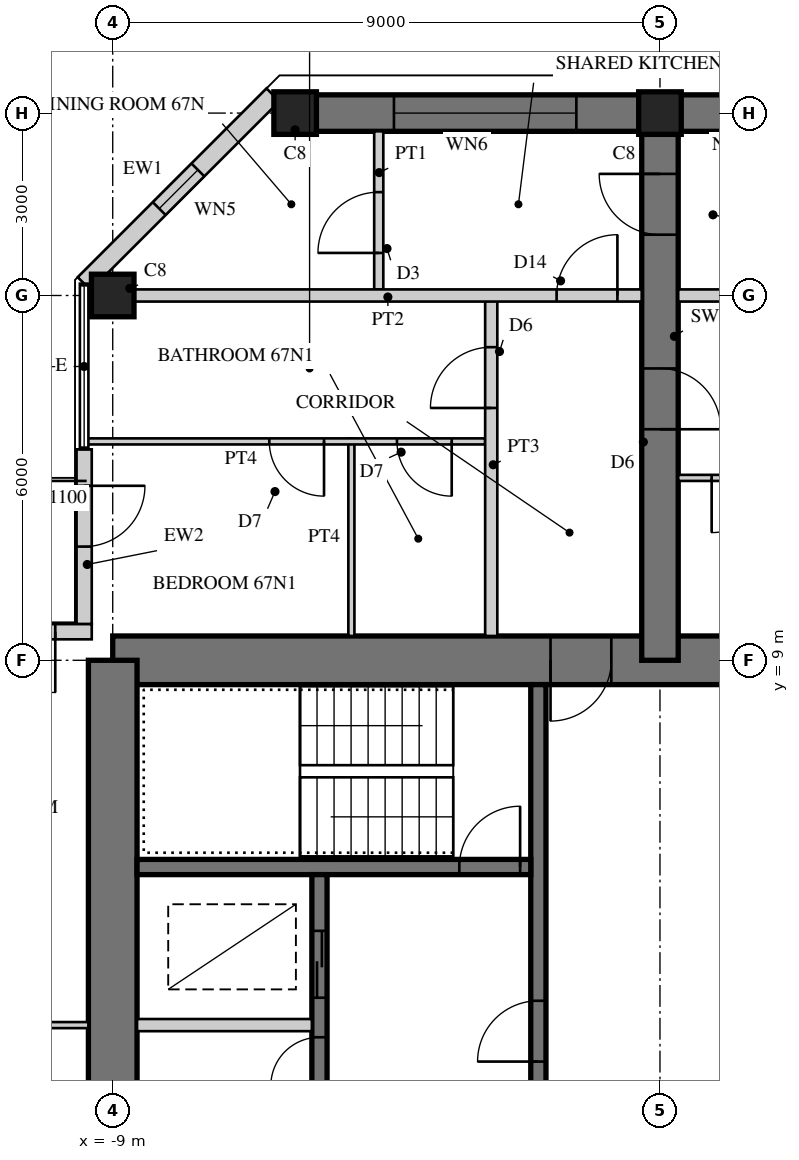
"""IFC4 building model, lengths in metres.
Left out: names, types, materials, properties, quantities, classifications, styles, units other than length and angle.
Written with IfcOpenShell. Run it as: python <this file> out.ifc"""

import sys

from ifc_helpers import new_model, si_unit, direction, frame, frame_2d, origin, origin_2d, place, context, subcontext, project, spatial, rectangle, hollow_rectangle, extrude, element, fill, save


model = new_model("IFC4")
c1 = context("Model", 3, precision=1e-05, world=origin(), true_north=direction((0.0, 1.0)))
c2 = subcontext(c1, "Body", "Model", "MODEL_VIEW")
j1 = project(units=[si_unit("LENGTHUNIT", "METRE"), si_unit("PLANEANGLEUNIT", "RADIAN")], contexts=[c1])
p1 = place(None, origin())
s1 = spatial("IfcSite", under=j1, at=p1, CompositionType="ELEMENT")
p2 = place(p1, origin())
s2 = spatial("IfcBuilding", under=s1, at=p2, CompositionType="ELEMENT")
p3 = place(p2, frame((0.0, 0.0, 261.1)))
s3 = spatial("IfcBuildingStorey", under=s2, at=p3, CompositionType="ELEMENT", Elevation=261.1)
p4 = place(p3, frame((9.0, 9.0, 0.0), z_axis=(0.0, 0.0, 1.0), x_axis=(-1.0, 0.0, 0.0)))
e1 = element("IfcWall", 1, at=p4, inside=s3, PredefinedType="SHEAR", context=c2, shape_type="SweptSolid", body=[
    extrude(rectangle(XDim=18.0, YDim=0.8, at=frame_2d((9.0, 0.0))), origin(), (0.0, 0.0, 1.0), 3.4),
])
p5 = place(p4, frame((9.8, 0.0, 0.0)))
e2 = element("IfcOpeningElement", 2, at=p5, cuts=e1, PredefinedType="OPENING", context=c2, shape_type="SweptSolid", body=[
    extrude(rectangle(XDim=1.0, YDim=2.4, at=frame_2d((0.5, 1.2))), frame((0.0, 0.41, 0.0), z_axis=(0.0, -1.0, 0.0), x_axis=(1.0, 0.0, 0.0)), (0.0, 0.0, 1.0), 0.82),
])
p6 = place(p3, frame((-9.0, 9.0, 0.0), z_axis=(0.0, 0.0, 1.0), x_axis=(0.0, -1.0, 0.0)))
e3 = element("IfcWall", 3, at=p6, inside=s3, PredefinedType="SHEAR", context=c2, shape_type="SweptSolid", body=[
    extrude(rectangle(XDim=18.0, YDim=0.8, at=frame_2d((9.0, 0.0))), origin(), (0.0, 0.0, 1.0), 3.4),
])
p7 = place(p6, frame((9.8, 0.0, 0.0)))
e4 = element("IfcOpeningElement", 4, at=p7, cuts=e3, PredefinedType="OPENING", context=c2, shape_type="SweptSolid", body=[
    extrude(rectangle(XDim=1.0, YDim=2.4, at=frame_2d((0.5, 1.2))), frame((0.0, 0.41, 0.0), z_axis=(0.0, -1.0, 0.0), x_axis=(1.0, 0.0, 0.0)), (0.0, 0.0, 1.0), 0.82),
])
p8 = place(p3, frame((-2.0, 1.675, 0.0), z_axis=(0.0, 0.0, 1.0), x_axis=(0.0, 1.0, 0.0)))
e5 = element("IfcWall", 5, at=p8, inside=s3, PredefinedType="SHEAR", context=c2, shape_type="SweptSolid", body=[
    extrude(rectangle(XDim=6.925, YDim=0.25, at=frame_2d((3.462, 0.0))), origin(), (0.0, 0.0, 1.0), 3.4),
])
p9 = place(p8, frame((0.725, 0.0, 0.0)))
e6 = element("IfcOpeningElement", 6, at=p9, cuts=e5, PredefinedType="OPENING", context=c2, shape_type="SweptSolid", body=[
    extrude(rectangle(XDim=1.0, YDim=2.1, at=frame_2d((0.5, 1.05))), frame((0.0, 0.135, 0.0), z_axis=(0.0, -1.0, 0.0), x_axis=(1.0, 0.0, 0.0)), (0.0, 0.0, 1.0), 0.27),
])
p10 = place(p3, frame((-2.125, 5.6, 0.0), z_axis=(0.0, 0.0, 1.0), x_axis=(-1.0, 0.0, 0.0)))
e7 = element("IfcWall", 7, at=p10, inside=s3, PredefinedType="SHEAR", context=c2, shape_type="SweptSolid", body=[
    extrude(rectangle(XDim=6.475, YDim=0.25, at=frame_2d((3.238, 0.0))), origin(), (0.0, 0.0, 1.0), 3.4),
])
p11 = place(p10, frame((0.175, 0.0, 0.0)))
e8 = element("IfcOpeningElement", 8, at=p11, cuts=e7, PredefinedType="OPENING", context=c2, shape_type="SweptSolid", body=[
    extrude(rectangle(XDim=1.0, YDim=2.1, at=frame_2d((0.5, 1.05))), frame((0.0, 0.135, 0.0), z_axis=(0.0, -1.0, 0.0), x_axis=(1.0, 0.0, 0.0)), (0.0, 0.0, 1.0), 0.27),
])
p12 = place(p3, frame((-5.6, 1.925, 0.0), z_axis=(0.0, 0.0, 1.0), x_axis=(0.0, 1.0, 0.0)))
e9 = element("IfcWall", 9, at=p12, inside=s3, PredefinedType="SHEAR", context=c2, shape_type="SweptSolid", body=[
    extrude(rectangle(XDim=3.55, YDim=0.25, at=frame_2d((1.775, 0.0))), origin(), (0.0, 0.0, 1.0), 3.4),
])
p13 = place(p12, frame((1.525, 0.0, 0.0)))
e10 = element("IfcOpeningElement", 10, at=p13, cuts=e9, PredefinedType="OPENING", context=c2, shape_type="SweptSolid", body=[
    extrude(rectangle(XDim=1.1, YDim=2.2, at=frame_2d((0.55, 1.1))), frame((0.0, 0.135, 0.0), z_axis=(0.0, -1.0, 0.0), x_axis=(1.0, 0.0, 0.0)), (0.0, 0.0, 1.0), 0.27),
])
p14 = place(p12, frame((0.075, 0.0, 0.0)))
e11 = element("IfcOpeningElement", 11, at=p14, cuts=e9, PredefinedType="OPENING", context=c2, shape_type="SweptSolid", body=[
    extrude(rectangle(XDim=0.8, YDim=2.1, at=frame_2d((0.4, 1.05))), frame((0.0, 0.135, 0.0), z_axis=(0.0, -1.0, 0.0), x_axis=(1.0, 0.0, 0.0)), (0.0, 0.0, 1.0), 0.27),
])
p15 = place(p3, frame((-5.725, 3.0, 0.0), z_axis=(0.0, 0.0, 1.0), x_axis=(-1.0, 0.0, 0.0)))
e12 = element("IfcWall", 12, at=p15, inside=s3, PredefinedType="PARTITIONING", context=c2, shape_type="SweptSolid", body=[
    extrude(rectangle(XDim=2.875, YDim=0.2, at=frame_2d((1.438, 0.0))), origin(), (0.0, 0.0, 1.0), 3.4),
])
p16 = place(p3, frame((0.0, 9.0, 0.0), z_axis=(0.0, 0.0, 1.0), x_axis=(0.0, 1.0, 0.0)))
e13 = element("IfcWall", 13, at=p16, inside=s3, PredefinedType="SHEAR", context=c2, shape_type="SweptSolid", body=[
    extrude(rectangle(XDim=9.0, YDim=0.6, at=frame_2d((4.5, 0.0))), origin(), (0.0, 0.0, 1.0), 3.4),
])
p17 = place(p16, frame((3.8, 0.0, 0.0)))
e14 = element("IfcOpeningElement", 14, at=p17, cuts=e13, PredefinedType="OPENING", context=c2, shape_type="SweptSolid", body=[
    extrude(rectangle(XDim=1.0, YDim=2.15, at=frame_2d((0.5, 1.075))), frame((0.0, 0.31, 0.0), z_axis=(0.0, -1.0, 0.0), x_axis=(1.0, 0.0, 0.0)), (0.0, 0.0, 1.0), 0.62),
])
p18 = place(p16, frame((7.0, 0.0, 0.0)))
e15 = element("IfcOpeningElement", 15, at=p18, cuts=e13, PredefinedType="OPENING", context=c2, shape_type="SweptSolid", body=[
    extrude(rectangle(XDim=1.0, YDim=2.2, at=frame_2d((0.5, 1.1))), frame((0.0, 0.31, 0.0), z_axis=(0.0, -1.0, 0.0), x_axis=(1.0, 0.0, 0.0)), (0.0, 0.0, 1.0), 0.62),
])
p19 = place(p3, frame((6.0, 18.0, 0.0), z_axis=(0.0, 0.0, 1.0), x_axis=(-1.0, 0.0, 0.0)))
e16 = element("IfcWall", 16, at=p19, inside=s3, PredefinedType="SHEAR", context=c2, shape_type="SweptSolid", body=[
    extrude(rectangle(XDim=12.0, YDim=0.6, at=frame_2d((6.0, 0.0))), origin(), (0.0, 0.0, 1.0), 3.4),
])
p20 = place(p19, frame((1.625, 0.0, 0.6)))
e17 = element("IfcOpeningElement", 17, at=p20, cuts=e16, PredefinedType="OPENING", context=c2, shape_type="SweptSolid", body=[
    extrude(rectangle(XDim=3.0, YDim=2.4, at=frame_2d((1.5, 1.2))), frame((0.0, 0.31, 0.0), z_axis=(0.0, -1.0, 0.0), x_axis=(1.0, 0.0, 0.0)), (0.0, 0.0, 1.0), 0.62),
])
p21 = place(p19, frame((7.375, 0.0, 0.6)))
e18 = element("IfcOpeningElement", 18, at=p21, cuts=e16, PredefinedType="OPENING", context=c2, shape_type="SweptSolid", body=[
    extrude(rectangle(XDim=3.0, YDim=2.4, at=frame_2d((1.5, 1.2))), frame((0.0, 0.31, 0.0), z_axis=(0.0, -1.0, 0.0), x_axis=(1.0, 0.0, 0.0)), (0.0, 0.0, 1.0), 0.62),
])
for number, where, z_axis, x_axis in (
    (19, (-9.0, 15.0, 0.0), (0.0, 0.0, 1.0), (1.0, 0.0, 0.0)),
    (20, (0.0, 18.0, 0.0), (0.0, 0.0, 1.0), (1.0, 0.0, 0.0)),
    (21, (-6.0, 18.0, 0.0), (0.0, 0.0, 1.0), (1.0, 0.0, 0.0)),
):
    element("IfcColumn", number, at=place(p3, frame(where, z_axis=z_axis, x_axis=x_axis)), inside=s3, PredefinedType="COLUMN", context=c2, shape_type="SweptSolid", body=[
        extrude(rectangle(XDim=0.7, YDim=0.7, at=origin_2d()), origin(), (0.0, 0.0, 1.0), 3.4),
    ])
p22 = place(p3, frame((-6.365, 18.3, 0.0), z_axis=(0.0, 0.0, 1.0), x_axis=(-0.70707898447, -0.707134576811, 0.0)))
e22 = element("IfcWall", 22, at=p22, inside=s3, PredefinedType="SOLIDWALL", context=c2, shape_type="SweptSolid", body=[
    extrude(rectangle(XDim=4.392, YDim=0.3, at=frame_2d((2.196, 0.0))), origin(), (0.0, 0.0, 1.0), 3.22),
])
p23 = place(p22, frame((1.746, 0.0, 0.3)))
e23 = element("IfcOpeningElement", 23, at=p23, cuts=e22, PredefinedType="OPENING", context=c2, shape_type="SweptSolid", body=[
    extrude(rectangle(XDim=0.9, YDim=2.4, at=frame_2d((0.45, 1.2))), frame((0.0, 0.16, 0.0), z_axis=(0.0, -1.0, 0.0), x_axis=(1.0, 0.0, 0.0)), (0.0, 0.0, 1.0), 0.32),
])
p24 = place(p3, frame((-9.47, 12.47, 0.0), z_axis=(0.0, 0.0, 1.0), x_axis=(0.0, -1.0, 0.0)))
e24 = element("IfcWall", 24, at=p24, inside=s3, PredefinedType="SOLIDWALL", context=c2, shape_type="SweptSolid", body=[
    extrude(rectangle(XDim=2.875, YDim=0.25, at=frame_2d((1.438, 0.0))), origin(), (0.0, 0.0, 1.0), 3.22),
])
p25 = place(p24, frame((0.6, 0.0, 0.0)))
e25 = element("IfcOpeningElement", 25, at=p25, cuts=e24, PredefinedType="OPENING", context=c2, shape_type="SweptSolid", body=[
    extrude(rectangle(XDim=1.0, YDim=2.2, at=frame_2d((0.5, 1.1))), frame((0.0, 0.135, 0.0), z_axis=(0.0, -1.0, 0.0), x_axis=(1.0, 0.0, 0.0)), (0.0, 0.0, 1.0), 0.27),
])
p26 = place(p3, frame((-9.345, 9.47, 0.0), z_axis=(0.0, 0.0, 1.0), x_axis=(-1.0, 0.0, 0.0)))
e26 = element("IfcWall", 26, at=p26, inside=s3, PredefinedType="SOLIDWALL", context=c2, shape_type="SweptSolid", body=[
    extrude(rectangle(XDim=3.125, YDim=0.25, at=frame_2d((1.562, 0.0))), origin(), (0.0, 0.0, 1.0), 3.22),
])
p27 = place(p26, frame((0.6, 0.0, 0.0)))
e27 = element("IfcOpeningElement", 27, at=p27, cuts=e26, PredefinedType="OPENING", context=c2, shape_type="SweptSolid", body=[
    extrude(rectangle(XDim=1.0, YDim=2.2, at=frame_2d((0.5, 1.1))), frame((0.0, 0.135, 0.0), z_axis=(0.0, -1.0, 0.0), x_axis=(1.0, 0.0, 0.0)), (0.0, 0.0, 1.0), 0.27),
])
p28 = place(p3, frame((-5.075, 9.4, 0.0), z_axis=(0.0, 0.0, 1.0), x_axis=(0.0, 1.0, 0.0)))
e28 = element("IfcWall", 28, at=p28, inside=s3, PredefinedType="PARTITIONING", context=c2, shape_type="SweptSolid", body=[
    extrude(rectangle(XDim=3.25, YDim=0.1, at=frame_2d((1.625, 0.0))), origin(), (0.0, 0.0, 1.0), 3.22),
])
p29 = place(p3, frame((-2.875, 12.6, 0.0), z_axis=(0.0, 0.0, 1.0), x_axis=(-1.0, 0.0, 0.0)))
e29 = element("IfcWall", 29, at=p29, inside=s3, PredefinedType="PARTITIONING", context=c2, shape_type="SweptSolid", body=[
    extrude(rectangle(XDim=6.555, YDim=0.1, at=frame_2d((3.277, 0.0))), origin(), (0.0, 0.0, 1.0), 3.22),
])
p30 = place(p29, frame((0.55, 0.0, 0.0)))
e30 = element("IfcOpeningElement", 30, at=p30, cuts=e29, PredefinedType="OPENING", context=c2, shape_type="SweptSolid", body=[
    extrude(rectangle(XDim=0.9, YDim=2.1, at=frame_2d((0.45, 1.05))), frame((0.0, 0.06, 0.0), z_axis=(0.0, -1.0, 0.0), x_axis=(1.0, 0.0, 0.0)), (0.0, 0.0, 1.0), 0.12),
])
p31 = place(p29, frame((2.65, 0.0, 0.0)))
e31 = element("IfcOpeningElement", 31, at=p31, cuts=e29, PredefinedType="OPENING", context=c2, shape_type="SweptSolid", body=[
    extrude(rectangle(XDim=0.9, YDim=2.1, at=frame_2d((0.45, 1.05))), frame((0.0, 0.06, 0.0), z_axis=(0.0, -1.0, 0.0), x_axis=(1.0, 0.0, 0.0)), (0.0, 0.0, 1.0), 0.12),
])
p32 = place(p3, frame((9.345, 12.0, 0.0), z_axis=(0.0, 0.0, 1.0), x_axis=(-1.0, 0.0, 0.0)))
e32 = element("IfcWall", 32, at=p32, inside=s3, PredefinedType="PARTITIONING", context=c2, shape_type="SweptSolid", body=[
    extrude(rectangle(XDim=9.045, YDim=0.1, at=frame_2d((4.522, 0.0))), origin(), (0.0, 0.0, 1.0), 3.22),
])
p33 = place(p32, frame((5.495, 0.0, 0.0)))
e33 = element("IfcOpeningElement", 33, at=p33, cuts=e32, PredefinedType="OPENING", context=c2, shape_type="SweptSolid", body=[
    extrude(rectangle(XDim=0.9, YDim=2.1, at=frame_2d((0.45, 1.05))), frame((0.0, 0.06, 0.0), z_axis=(0.0, -1.0, 0.0), x_axis=(1.0, 0.0, 0.0)), (0.0, 0.0, 1.0), 0.12),
])
p34 = place(p32, frame((7.595, 0.0, 0.0)))
e34 = element("IfcOpeningElement", 34, at=p34, cuts=e32, PredefinedType="OPENING", context=c2, shape_type="SweptSolid", body=[
    extrude(rectangle(XDim=0.9, YDim=2.1, at=frame_2d((0.45, 1.05))), frame((0.0, 0.06, 0.0), z_axis=(0.0, -1.0, 0.0), x_axis=(1.0, 0.0, 0.0)), (0.0, 0.0, 1.0), 0.12),
])
p35 = place(p3, frame((-2.775, 9.4, 0.0), z_axis=(0.0, 0.0, 1.0), x_axis=(0.0, 1.0, 0.0)))
e35 = element("IfcWall", 35, at=p35, inside=s3, PredefinedType="SOLIDWALL", context=c2, shape_type="SweptSolid", body=[
    extrude(rectangle(XDim=5.6, YDim=0.2, at=frame_2d((2.8, 0.0))), origin(), (0.0, 0.0, 1.0), 3.22),
])
p36 = place(p35, frame((3.75, 0.0, 0.0)))
e36 = element("IfcOpeningElement", 36, at=p36, cuts=e35, PredefinedType="OPENING", context=c2, shape_type="SweptSolid", body=[
    extrude(rectangle(XDim=1.0, YDim=2.15, at=frame_2d((0.5, 1.075))), frame((0.0, 0.11, 0.0), z_axis=(0.0, -1.0, 0.0), x_axis=(1.0, 0.0, 0.0)), (0.0, 0.0, 1.0), 0.22),
])
p37 = place(p3, frame((-4.625, 15.1, 0.0), z_axis=(0.0, 0.0, 1.0), x_axis=(0.0, 1.0, 0.0)))
e37 = element("IfcWall", 37, at=p37, inside=s3, PredefinedType="PARTITIONING", context=c2, shape_type="SweptSolid", body=[
    extrude(rectangle(XDim=2.6, YDim=0.15, at=frame_2d((1.3, 0.0))), origin(), (0.0, 0.0, 1.0), 3.22),
])
p38 = place(p37, frame((0.6, 0.0, 0.0)))
e38 = element("IfcOpeningElement", 38, at=p38, cuts=e37, PredefinedType="OPENING", context=c2, shape_type="SweptSolid", body=[
    extrude(rectangle(XDim=1.0, YDim=2.1, at=frame_2d((0.5, 1.05))), frame((0.0, 0.085, 0.0), z_axis=(0.0, -1.0, 0.0), x_axis=(1.0, 0.0, 0.0)), (0.0, 0.0, 1.0), 0.17),
])
p39 = place(p3, frame((8.65, 15.0, 0.0), z_axis=(0.0, 0.0, 1.0), x_axis=(-1.0, 0.0, 0.0)))
e39 = element("IfcWall", 39, at=p39, inside=s3, PredefinedType="SOLIDWALL", context=c2, shape_type="SweptSolid", body=[
    extrude(rectangle(XDim=8.35, YDim=0.2, at=frame_2d((4.175, 0.0))), origin(), (0.0, 0.0, 1.0), 2.52),
])
p40 = place(p3, frame((-0.3, 15.0, 0.0), z_axis=(0.0, 0.0, 1.0), x_axis=(-1.0, 0.0, 0.0)))
e40 = element("IfcWall", 40, at=p40, inside=s3, PredefinedType="SOLIDWALL", context=c2, shape_type="SweptSolid", body=[
    extrude(rectangle(XDim=8.35, YDim=0.2, at=frame_2d((4.175, 0.0))), origin(), (0.0, 0.0, 1.0), 2.52),
])
p41 = place(p40, frame((0.4, 0.0, 0.0)))
e41 = element("IfcOpeningElement", 41, at=p41, cuts=e40, PredefinedType="OPENING", context=c2, shape_type="SweptSolid", body=[
    extrude(rectangle(XDim=1.0, YDim=2.2, at=frame_2d((0.5, 1.1))), frame((0.0, 0.11, 0.0), z_axis=(0.0, -1.0, 0.0), x_axis=(1.0, 0.0, 0.0)), (0.0, 0.0, 1.0), 0.22),
])
p42 = place(p3, frame((-9.4, 3.0, 0.0), z_axis=(0.0, 0.0, 1.0), x_axis=(-1.0, 0.0, 0.0)))
e42 = element("IfcWall", 42, at=p42, inside=s3, PredefinedType="PARTITIONING", context=c2, shape_type="SweptSolid", body=[
    extrude(rectangle(XDim=2.65, YDim=0.1, at=frame_2d((1.325, 0.0))), origin(), (0.0, 0.0, 1.0), 3.22),
])
p43 = place(p21, origin())
e43 = element("IfcWindow", 43, at=p43, inside=s3, PartitioningType="SINGLE_PANEL", PredefinedType="WINDOW", context=c2, shape_type="SweptSolid", body=[
    extrude(hollow_rectangle(XDim=3.0, YDim=2.4, WallThickness=0.06, at=frame_2d((1.5, 1.2))), frame((0.0, 0.03, 0.0), z_axis=(0.0, -1.0, 0.0), x_axis=(1.0, 0.0, 0.0)), (0.0, 0.0, 1.0), 0.06),
    extrude(rectangle(XDim=2.879, YDim=2.279, at=frame_2d((1.5, 1.2))), frame((0.0, 0.03, 0.0), z_axis=(0.0, -1.0, 0.0), x_axis=(1.0, 0.0, 0.0)), (0.0, 0.0, 1.0), 0.06),
])
fill(e18, e43)
p44 = place(p23, origin())
e44 = element("IfcWindow", 44, at=p44, inside=s3, PartitioningType="SINGLE_PANEL", PredefinedType="WINDOW", context=c2, shape_type="SweptSolid", body=[
    extrude(hollow_rectangle(XDim=0.9, YDim=2.4, WallThickness=0.06, at=frame_2d((0.45, 1.2))), frame((0.0, 0.03, 0.0), z_axis=(0.0, -1.0, 0.0), x_axis=(1.0, 0.0, 0.0)), (0.0, 0.0, 1.0), 0.06),
    extrude(rectangle(XDim=0.779, YDim=2.279, at=frame_2d((0.45, 1.2))), frame((0.0, 0.03, 0.0), z_axis=(0.0, -1.0, 0.0), x_axis=(1.0, 0.0, 0.0)), (0.0, 0.0, 1.0), 0.06),
])
fill(e23, e44)
p45 = place(p25, origin())
e45 = element("IfcDoor", 45, at=p45, inside=s3, OperationType="SINGLE_SWING_LEFT", PredefinedType="DOOR", context=c2, shape_type="SweptSolid", body=[
    extrude(hollow_rectangle(XDim=1.0, YDim=2.2, WallThickness=0.06, at=frame_2d((0.5, 1.1))), frame((0.0, 0.025, 0.0), z_axis=(0.0, -1.0, 0.0), x_axis=(1.0, 0.0, 0.0)), (0.0, 0.0, 1.0), 0.05),
    extrude(rectangle(XDim=0.879, YDim=2.079, at=frame_2d((0.5, 1.1))), frame((0.0, 0.025, 0.0), z_axis=(0.0, -1.0, 0.0), x_axis=(1.0, 0.0, 0.0)), (0.0, 0.0, 1.0), 0.05),
])
fill(e25, e45)
p46 = place(p27, origin())
e46 = element("IfcDoor", 46, at=p46, inside=s3, OperationType="SINGLE_SWING_LEFT", PredefinedType="DOOR", context=c2, shape_type="SweptSolid", body=[
    extrude(hollow_rectangle(XDim=1.0, YDim=2.2, WallThickness=0.06, at=frame_2d((0.5, 1.1))), frame((0.0, 0.025, 0.0), z_axis=(0.0, -1.0, 0.0), x_axis=(1.0, 0.0, 0.0)), (0.0, 0.0, 1.0), 0.05),
    extrude(rectangle(XDim=0.879, YDim=2.079, at=frame_2d((0.5, 1.1))), frame((0.0, 0.025, 0.0), z_axis=(0.0, -1.0, 0.0), x_axis=(1.0, 0.0, 0.0)), (0.0, 0.0, 1.0), 0.05),
])
fill(e27, e46)
p47 = place(p30, origin())
e47 = element("IfcDoor", 47, at=p47, inside=s3, OperationType="SINGLE_SWING_LEFT", PredefinedType="DOOR", context=c2, shape_type="SweptSolid", body=[
    extrude(rectangle(XDim=0.9, YDim=2.1, at=frame_2d((0.45, 1.05))), frame((0.0, 0.025, 0.0), z_axis=(0.0, -1.0, 0.0), x_axis=(1.0, 0.0, 0.0)), (0.0, 0.0, 1.0), 0.05),
])
fill(e30, e47)
p48 = place(p31, origin())
e48 = element("IfcDoor", 48, at=p48, inside=s3, OperationType="SINGLE_SWING_LEFT", PredefinedType="DOOR", context=c2, shape_type="SweptSolid", body=[
    extrude(rectangle(XDim=0.9, YDim=2.1, at=frame_2d((0.45, 1.05))), frame((0.0, 0.025, 0.0), z_axis=(0.0, -1.0, 0.0), x_axis=(1.0, 0.0, 0.0)), (0.0, 0.0, 1.0), 0.05),
])
fill(e31, e48)
p49 = place(p34, origin())
e49 = element("IfcDoor", 49, at=p49, inside=s3, OperationType="SINGLE_SWING_RIGHT", PredefinedType="DOOR", context=c2, shape_type="SweptSolid", body=[
    extrude(rectangle(XDim=0.9, YDim=2.1, at=frame_2d((0.45, 1.05))), frame((0.0, 0.025, 0.0), z_axis=(0.0, -1.0, 0.0), x_axis=(1.0, 0.0, 0.0)), (0.0, 0.0, 1.0), 0.05),
])
fill(e34, e49)
p50 = place(p36, origin())
e50 = element("IfcDoor", 50, at=p50, inside=s3, OperationType="SINGLE_SWING_LEFT", PredefinedType="DOOR", context=c2, shape_type="SweptSolid", body=[
    extrude(rectangle(XDim=1.0, YDim=2.15, at=frame_2d((0.5, 1.075))), frame((0.0, 0.025, 0.0), z_axis=(0.0, -1.0, 0.0), x_axis=(1.0, 0.0, 0.0)), (0.0, 0.0, 1.0), 0.05),
])
fill(e36, e50)
p51 = place(p38, origin())
e51 = element("IfcDoor", 51, at=p51, inside=s3, OperationType="SINGLE_SWING_LEFT", PredefinedType="DOOR", context=c2, shape_type="SweptSolid", body=[
    extrude(rectangle(XDim=1.0, YDim=2.1, at=frame_2d((0.5, 1.05))), frame((0.0, 0.025, 0.0), z_axis=(0.0, -1.0, 0.0), x_axis=(1.0, 0.0, 0.0)), (0.0, 0.0, 1.0), 0.05),
])
fill(e38, e51)
p52 = place(p41, frame((1.0, 0.0, 0.0), z_axis=(0.0, 0.0, 1.0), x_axis=(-1.0, 0.0, 0.0)))
e52 = element("IfcDoor", 52, at=p52, inside=s3, OperationType="SINGLE_SWING_RIGHT", PredefinedType="DOOR", context=c2, shape_type="SweptSolid", body=[
    extrude(rectangle(XDim=1.0, YDim=2.2, at=frame_2d((0.5, 1.1))), frame((0.0, 0.025, 0.0), z_axis=(0.0, -1.0, 0.0), x_axis=(1.0, 0.0, 0.0)), (0.0, 0.0, 1.0), 0.05),
])
fill(e41, e52)
p53 = place(p17, frame((1.0, 0.0, 0.0), z_axis=(0.0, 0.0, 1.0), x_axis=(-1.0, 0.0, 0.0)))
e53 = element("IfcDoor", 53, at=p53, inside=s3, OperationType="SINGLE_SWING_RIGHT", PredefinedType="DOOR", context=c2, shape_type="SweptSolid", body=[
    extrude(rectangle(XDim=1.0, YDim=2.15, at=frame_2d((0.5, 1.075))), frame((0.0, 0.025, 0.0), z_axis=(0.0, -1.0, 0.0), x_axis=(1.0, 0.0, 0.0)), (0.0, 0.0, 1.0), 0.05),
])
fill(e14, e53)
p54 = place(p18, origin())
e54 = element("IfcDoor", 54, at=p54, inside=s3, OperationType="SINGLE_SWING_RIGHT", PredefinedType="DOOR", context=c2, shape_type="SweptSolid", body=[
    extrude(rectangle(XDim=1.0, YDim=2.2, at=frame_2d((0.5, 1.1))), frame((0.0, 0.025, 0.0), z_axis=(0.0, -1.0, 0.0), x_axis=(1.0, 0.0, 0.0)), (0.0, 0.0, 1.0), 0.05),
])
fill(e15, e54)
p55 = place(p5, origin())
e55 = element("IfcDoor", 55, at=p55, inside=s3, OperationType="SINGLE_SWING_RIGHT", PredefinedType="DOOR", context=c2, shape_type="SweptSolid", body=[
    extrude(rectangle(XDim=1.0, YDim=2.4, at=frame_2d((0.5, 1.2))), frame((0.0, 0.055, 0.0), z_axis=(0.0, -1.0, 0.0), x_axis=(1.0, 0.0, 0.0)), (0.0, 0.0, 1.0), 0.05),
])
fill(e2, e55)
p56 = place(p9, origin())
e56 = element("IfcDoor", 56, at=p56, inside=s3, OperationType="SINGLE_SWING_LEFT", PredefinedType="DOOR", context=c2, shape_type="SweptSolid", body=[
    extrude(rectangle(XDim=1.0, YDim=2.1, at=frame_2d((0.5, 1.05))), frame((0.0, 0.025, 0.0), z_axis=(0.0, -1.0, 0.0), x_axis=(1.0, 0.0, 0.0)), (0.0, 0.0, 1.0), 0.05),
])
fill(e6, e56)
p57 = place(p11, frame((1.0, 0.0, 0.0), z_axis=(0.0, 0.0, 1.0), x_axis=(-1.0, 0.0, 0.0)))
e57 = element("IfcDoor", 57, at=p57, inside=s3, OperationType="SINGLE_SWING_RIGHT", PredefinedType="DOOR", context=c2, shape_type="SweptSolid", body=[
    extrude(rectangle(XDim=1.0, YDim=2.1, at=frame_2d((0.5, 1.05))), frame((0.0, 0.025, 0.0), z_axis=(0.0, -1.0, 0.0), x_axis=(1.0, 0.0, 0.0)), (0.0, 0.0, 1.0), 0.05),
])
fill(e8, e57)
p58 = place(p13, origin())
e58 = element("IfcDoor", 58, at=p58, inside=s3, OperationType="DOUBLE_DOOR_SLIDING", PredefinedType="DOOR", context=c2, shape_type="SweptSolid", body=[
    extrude(rectangle(XDim=1.1, YDim=2.2, at=frame_2d((0.55, 1.1))), frame((0.0, 0.025, 0.0), z_axis=(0.0, -1.0, 0.0), x_axis=(1.0, 0.0, 0.0)), (0.0, 0.0, 1.0), 0.05),
])
fill(e10, e58)
p59 = place(p14, origin())
e59 = element("IfcDoor", 59, at=p59, inside=s3, OperationType="SINGLE_SWING_LEFT", PredefinedType="DOOR", context=c2, shape_type="SweptSolid", body=[
    extrude(rectangle(XDim=0.8, YDim=2.1, at=frame_2d((0.4, 1.05))), frame((0.0, 0.025, 0.0), z_axis=(0.0, -1.0, 0.0), x_axis=(1.0, 0.0, 0.0)), (0.0, 0.0, 1.0), 0.05),
])
fill(e11, e59)
save(model, sys.argv[1])
